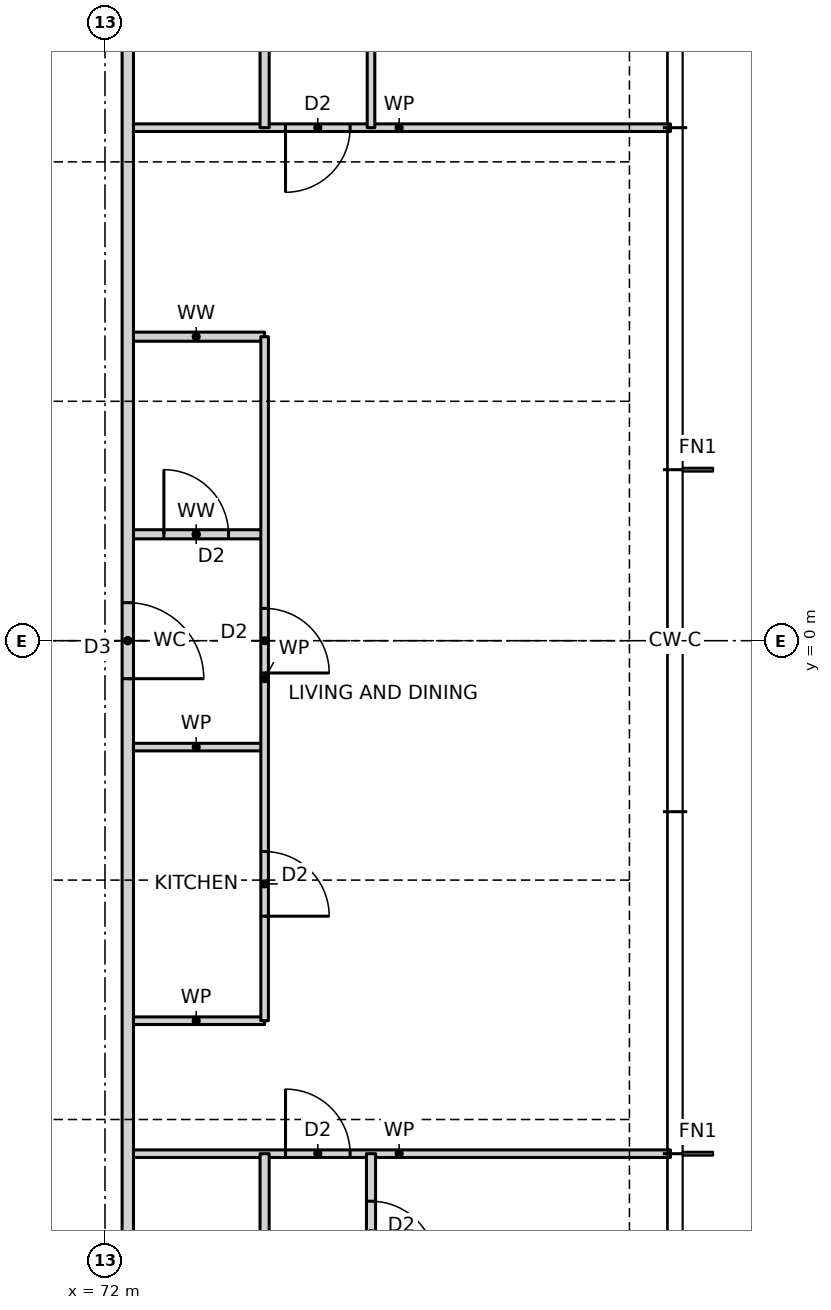
"""IFC4 building model, lengths in metres.
Left out: names, types, materials, properties, quantities, classifications, styles, units other than length and angle.
Written with IfcOpenShell. Run it as: python <this file> out.ifc"""

import sys

from ifc_helpers import new_model, si_unit, direction, frame, frame_2d, origin, place, context, subcontext, project, spatial, rectangle, extrude, element, fill, save


model = new_model("IFC4")
c1 = context("Model", 3, precision=1e-05, world=origin(), true_north=direction((0.0, 1.0)))
c2 = subcontext(c1, "Body", "Model", "MODEL_VIEW")
j1 = project(units=[si_unit("LENGTHUNIT", "METRE"), si_unit("PLANEANGLEUNIT", "RADIAN")], contexts=[c1])
p1 = place(None, origin())
s1 = spatial("IfcSite", under=j1, at=p1, CompositionType="ELEMENT")
p2 = place(p1, origin())
s2 = spatial("IfcBuilding", under=s1, at=p2, CompositionType="ELEMENT")
p3 = place(p2, frame((0.0, 0.0, 71.0)))
s3 = spatial("IfcBuildingStorey", under=s2, at=p3, CompositionType="ELEMENT", Elevation=71.0)
p4 = place(p3, frame((72.3, -6.75, 0.0), z_axis=(0.0, 0.0, 1.0), x_axis=(1.0, 0.0, 0.0)))
e1 = element("IfcWall", 1, at=p4, inside=s3, PredefinedType="PARTITIONING", context=c2, shape_type="SweptSolid", body=[
    extrude(rectangle(XDim=7.14, YDim=0.1, at=frame_2d((3.57, 0.0))), origin(), (0.0, 0.0, 1.0), 3.2),
])
p5 = place(p4, frame((2.075, 0.0, 0.0)))
e2 = element("IfcOpeningElement", 2, at=p5, cuts=e1, PredefinedType="OPENING", context=c2, shape_type="SweptSolid", body=[
    extrude(rectangle(XDim=0.85, YDim=2.1, at=frame_2d((0.425, 1.05))), frame((0.0, 0.06, 0.0), z_axis=(0.0, -1.0, 0.0), x_axis=(1.0, 0.0, 0.0)), (0.0, 0.0, 1.0), 0.12),
])
for number, where, z_axis, x_axis in (
    (3, (72.3, -5.0, 0.0), (0.0, 0.0, 1.0), (1.0, 0.0, 0.0)),
    (4, (72.3, -1.4, 0.0), (0.0, 0.0, 1.0), (1.0, 0.0, 0.0)),
):
    element("IfcWall", number, at=place(p3, frame(where, z_axis=z_axis, x_axis=x_axis)), inside=s3, PredefinedType="PARTITIONING", context=c2, shape_type="SweptSolid", body=[
        extrude(rectangle(XDim=1.8, YDim=0.1, at=frame_2d((0.9, 0.0))), origin(), (0.0, 0.0, 1.0), 3.2),
    ])
p6 = place(p3, frame((72.3, 1.4, 0.0), z_axis=(0.0, 0.0, 1.0), x_axis=(1.0, 0.0, 0.0)))
e5 = element("IfcWall", 5, at=p6, inside=s3, PredefinedType="PARTITIONING", context=c2, shape_type="SweptSolid", body=[
    extrude(rectangle(XDim=1.8, YDim=0.12, at=frame_2d((0.9, 0.0))), origin(), (0.0, 0.0, 1.0), 3.2),
])
p7 = place(p6, frame((0.475, 0.0, 0.0)))
e6 = element("IfcOpeningElement", 6, at=p7, cuts=e5, PredefinedType="OPENING", context=c2, shape_type="SweptSolid", body=[
    extrude(rectangle(XDim=0.85, YDim=2.1, at=frame_2d((0.425, 1.05))), frame((0.0, 0.07, 0.0), z_axis=(0.0, -1.0, 0.0), x_axis=(1.0, 0.0, 0.0)), (0.0, 0.0, 1.0), 0.14),
])
p8 = place(p3, frame((72.3, 4.0, 0.0), z_axis=(0.0, 0.0, 1.0), x_axis=(1.0, 0.0, 0.0)))
e7 = element("IfcWall", 7, at=p8, inside=s3, PredefinedType="PARTITIONING", context=c2, shape_type="SweptSolid", body=[
    extrude(rectangle(XDim=1.8, YDim=0.12, at=frame_2d((0.9, 0.0))), origin(), (0.0, 0.0, 1.0), 3.2),
])
p9 = place(p3, frame((72.3, 6.75, 0.0), z_axis=(0.0, 0.0, 1.0), x_axis=(1.0, 0.0, 0.0)))
e8 = element("IfcWall", 8, at=p9, inside=s3, PredefinedType="PARTITIONING", context=c2, shape_type="SweptSolid", body=[
    extrude(rectangle(XDim=7.14, YDim=0.1, at=frame_2d((3.57, 0.0))), origin(), (0.0, 0.0, 1.0), 3.2),
])
p10 = place(p9, frame((2.075, 0.0, 0.0)))
e9 = element("IfcOpeningElement", 9, at=p10, cuts=e8, PredefinedType="OPENING", context=c2, shape_type="SweptSolid", body=[
    extrude(rectangle(XDim=0.85, YDim=2.1, at=frame_2d((0.425, 1.05))), frame((0.0, 0.06, 0.0), z_axis=(0.0, -1.0, 0.0), x_axis=(1.0, 0.0, 0.0)), (0.0, 0.0, 1.0), 0.12),
])
p11 = place(p3, frame((75.5, -13.45, 0.0), z_axis=(0.0, 0.0, 1.0), x_axis=(0.0, 1.0, 0.0)))
e10 = element("IfcWall", 10, at=p11, inside=s3, PredefinedType="PARTITIONING", context=c2, shape_type="SweptSolid", body=[
    extrude(rectangle(XDim=6.7, YDim=0.12, at=frame_2d((3.35, 0.0))), origin(), (0.0, 0.0, 1.0), 3.2),
])
p12 = place(p11, frame((5.225, 0.0, 0.0)))
e11 = element("IfcOpeningElement", 11, at=p12, cuts=e10, PredefinedType="OPENING", context=c2, shape_type="SweptSolid", body=[
    extrude(rectangle(XDim=0.85, YDim=2.1, at=frame_2d((0.425, 1.05))), frame((0.0, 0.07, 0.0), z_axis=(0.0, -1.0, 0.0), x_axis=(1.0, 0.0, 0.0)), (0.0, 0.0, 1.0), 0.14),
])
p13 = place(p11, frame((0.675, 0.0, 0.0)))
e12 = element("IfcOpeningElement", 12, at=p13, cuts=e10, PredefinedType="OPENING", context=c2, shape_type="SweptSolid", body=[
    extrude(rectangle(XDim=0.85, YDim=2.1, at=frame_2d((0.425, 1.05))), frame((0.0, 0.07, 0.0), z_axis=(0.0, -1.0, 0.0), x_axis=(1.0, 0.0, 0.0)), (0.0, 0.0, 1.0), 0.14),
])
p14 = place(p3, frame((75.5, 6.75, 0.0), z_axis=(0.0, 0.0, 1.0), x_axis=(0.0, 1.0, 0.0)))
e13 = element("IfcWall", 13, at=p14, inside=s3, PredefinedType="PARTITIONING", context=c2, shape_type="SweptSolid", body=[
    extrude(rectangle(XDim=6.7, YDim=0.1, at=frame_2d((3.35, 0.0))), origin(), (0.0, 0.0, 1.0), 3.2),
])
p15 = place(p14, frame((1.825, 0.0, 0.0)))
e14 = element("IfcOpeningElement", 14, at=p15, cuts=e13, PredefinedType="OPENING", context=c2, shape_type="SweptSolid", body=[
    extrude(rectangle(XDim=0.85, YDim=2.1, at=frame_2d((0.425, 1.05))), frame((0.0, 0.06, 0.0), z_axis=(0.0, -1.0, 0.0), x_axis=(1.0, 0.0, 0.0)), (0.0, 0.0, 1.0), 0.12),
])
p16 = place(p14, frame((5.175, 0.0, 0.0)))
e15 = element("IfcOpeningElement", 15, at=p16, cuts=e13, PredefinedType="OPENING", context=c2, shape_type="SweptSolid", body=[
    extrude(rectangle(XDim=0.85, YDim=2.1, at=frame_2d((0.425, 1.05))), frame((0.0, 0.06, 0.0), z_axis=(0.0, -1.0, 0.0), x_axis=(1.0, 0.0, 0.0)), (0.0, 0.0, 1.0), 0.12),
])
p17 = place(p3, frame((74.1, -12.614, 0.0), z_axis=(0.0, 0.0, 1.0), x_axis=(0.0, 1.0, 0.0)))
e16 = element("IfcWall", 16, at=p17, inside=s3, PredefinedType="PARTITIONING", context=c2, shape_type="SweptSolid", body=[
    extrude(rectangle(XDim=5.864, YDim=0.12, at=frame_2d((2.932, 0.0))), origin(), (0.0, 0.0, 1.0), 3.2),
])
p18 = place(p17, frame((2.507, 0.0, 0.0)))
e17 = element("IfcOpeningElement", 17, at=p18, cuts=e16, PredefinedType="OPENING", context=c2, shape_type="SweptSolid", body=[
    extrude(rectangle(XDim=0.85, YDim=2.1, at=frame_2d((0.425, 1.05))), frame((0.0, 0.07, 0.0), z_axis=(0.0, -1.0, 0.0), x_axis=(1.0, 0.0, 0.0)), (0.0, 0.0, 1.0), 0.14),
])
p19 = place(p3, frame((74.1, -5.0, 0.0), z_axis=(0.0, 0.0, 1.0), x_axis=(0.0, 1.0, 0.0)))
e18 = element("IfcWall", 18, at=p19, inside=s3, PredefinedType="PARTITIONING", context=c2, shape_type="SweptSolid", body=[
    extrude(rectangle(XDim=9.0, YDim=0.1, at=frame_2d((4.5, 0.0))), origin(), (0.0, 0.0, 1.0), 3.2),
])
p20 = place(p19, frame((1.375, 0.0, 0.0)))
e19 = element("IfcOpeningElement", 19, at=p20, cuts=e18, PredefinedType="OPENING", context=c2, shape_type="SweptSolid", body=[
    extrude(rectangle(XDim=0.85, YDim=2.1, at=frame_2d((0.425, 1.05))), frame((0.0, 0.06, 0.0), z_axis=(0.0, -1.0, 0.0), x_axis=(1.0, 0.0, 0.0)), (0.0, 0.0, 1.0), 0.12),
])
p21 = place(p19, frame((4.575, 0.0, 0.0)))
e20 = element("IfcOpeningElement", 20, at=p21, cuts=e18, PredefinedType="OPENING", context=c2, shape_type="SweptSolid", body=[
    extrude(rectangle(XDim=0.85, YDim=2.1, at=frame_2d((0.425, 1.05))), frame((0.0, 0.06, 0.0), z_axis=(0.0, -1.0, 0.0), x_axis=(1.0, 0.0, 0.0)), (0.0, 0.0, 1.0), 0.12),
])
p22 = place(p3, frame((74.1, 6.75, 0.0), z_axis=(0.0, 0.0, 1.0), x_axis=(0.0, 1.0, 0.0)))
e21 = element("IfcWall", 21, at=p22, inside=s3, PredefinedType="PARTITIONING", context=c2, shape_type="SweptSolid", body=[
    extrude(rectangle(XDim=5.864, YDim=0.12, at=frame_2d((2.932, 0.0))), origin(), (0.0, 0.0, 1.0), 3.2),
])
p23 = place(p22, frame((2.507, 0.0, 0.0)))
e22 = element("IfcOpeningElement", 22, at=p23, cuts=e21, PredefinedType="OPENING", context=c2, shape_type="SweptSolid", body=[
    extrude(rectangle(XDim=0.85, YDim=2.1, at=frame_2d((0.425, 1.05))), frame((0.0, 0.07, 0.0), z_axis=(0.0, -1.0, 0.0), x_axis=(1.0, 0.0, 0.0)), (0.0, 0.0, 1.0), 0.14),
])
p24 = place(p3, frame((72.3, -10.568, 0.0), z_axis=(0.0, 0.0, 1.0), x_axis=(0.0, 1.0, 0.0)))
e23 = element("IfcWall", 23, at=p24, inside=s3, PredefinedType="PARTITIONING", context=c2, shape_type="SweptSolid", body=[
    extrude(rectangle(XDim=21.136, YDim=0.15, at=frame_2d((10.568, 0.0))), origin(), (0.0, 0.0, 1.0), 3.2),
])
p25 = place(p24, frame((10.068, 0.0, 0.0)))
e24 = element("IfcOpeningElement", 24, at=p25, cuts=e23, PredefinedType="OPENING", context=c2, shape_type="SweptSolid", body=[
    extrude(rectangle(XDim=1.0, YDim=2.1, at=frame_2d((0.5, 1.05))), frame((0.0, 0.085, 0.0), z_axis=(0.0, -1.0, 0.0), x_axis=(1.0, 0.0, 0.0)), (0.0, 0.0, 1.0), 0.17),
])
p26 = place(p20, frame((0.85, 0.0, 0.0), z_axis=(0.0, 0.0, 1.0), x_axis=(-1.0, 0.0, 0.0)))
e25 = element("IfcDoor", 25, at=p26, inside=s3, OperationType="SINGLE_SWING_RIGHT", PredefinedType="DOOR", context=c2, shape_type="SweptSolid", body=[
    extrude(rectangle(XDim=0.85, YDim=2.1, at=frame_2d((0.425, 1.05))), frame((0.0, 0.025, 0.0), z_axis=(0.0, -1.0, 0.0), x_axis=(1.0, 0.0, 0.0)), (0.0, 0.0, 1.0), 0.05),
])
fill(e19, e25)
p27 = place(p25, frame((1.0, 0.0, 0.0), z_axis=(0.0, 0.0, 1.0), x_axis=(-1.0, 0.0, 0.0)))
e26 = element("IfcDoor", 26, at=p27, inside=s3, OperationType="SINGLE_SWING_RIGHT", PredefinedType="DOOR", context=c2, shape_type="SweptSolid", body=[
    extrude(rectangle(XDim=1.0, YDim=2.1, at=frame_2d((0.5, 1.05))), frame((0.0, 0.025, 0.0), z_axis=(0.0, -1.0, 0.0), x_axis=(1.0, 0.0, 0.0)), (0.0, 0.0, 1.0), 0.05),
])
fill(e24, e26)
p28 = place(p21, frame((0.85, 0.0, 0.0), z_axis=(0.0, 0.0, 1.0), x_axis=(-1.0, 0.0, 0.0)))
e27 = element("IfcDoor", 27, at=p28, inside=s3, OperationType="SINGLE_SWING_RIGHT", PredefinedType="DOOR", context=c2, shape_type="SweptSolid", body=[
    extrude(rectangle(XDim=0.85, YDim=2.1, at=frame_2d((0.425, 1.05))), frame((0.0, 0.025, 0.0), z_axis=(0.0, -1.0, 0.0), x_axis=(1.0, 0.0, 0.0)), (0.0, 0.0, 1.0), 0.05),
])
fill(e20, e27)
p29 = place(p7, origin())
e28 = element("IfcDoor", 28, at=p29, inside=s3, OperationType="SINGLE_SWING_LEFT", PredefinedType="DOOR", context=c2, shape_type="SweptSolid", body=[
    extrude(rectangle(XDim=0.85, YDim=2.1, at=frame_2d((0.425, 1.05))), frame((0.0, 0.025, 0.0), z_axis=(0.0, -1.0, 0.0), x_axis=(1.0, 0.0, 0.0)), (0.0, 0.0, 1.0), 0.05),
])
fill(e6, e28)
p30 = place(p5, origin())
e29 = element("IfcDoor", 29, at=p30, inside=s3, OperationType="SINGLE_SWING_LEFT", PredefinedType="DOOR", context=c2, shape_type="SweptSolid", body=[
    extrude(rectangle(XDim=0.85, YDim=2.1, at=frame_2d((0.425, 1.05))), frame((0.0, 0.025, 0.0), z_axis=(0.0, -1.0, 0.0), x_axis=(1.0, 0.0, 0.0)), (0.0, 0.0, 1.0), 0.05),
])
fill(e2, e29)
p31 = place(p12, frame((0.85, 0.0, 0.0), z_axis=(0.0, 0.0, 1.0), x_axis=(-1.0, 0.0, 0.0)))
e30 = element("IfcDoor", 30, at=p31, inside=s3, OperationType="SINGLE_SWING_RIGHT", PredefinedType="DOOR", context=c2, shape_type="SweptSolid", body=[
    extrude(rectangle(XDim=0.85, YDim=2.1, at=frame_2d((0.425, 1.05))), frame((0.0, 0.025, 0.0), z_axis=(0.0, -1.0, 0.0), x_axis=(1.0, 0.0, 0.0)), (0.0, 0.0, 1.0), 0.05),
])
fill(e11, e30)
p32 = place(p10, frame((0.85, 0.0, 0.0), z_axis=(0.0, 0.0, 1.0), x_axis=(-1.0, 0.0, 0.0)))
e31 = element("IfcDoor", 31, at=p32, inside=s3, OperationType="SINGLE_SWING_RIGHT", PredefinedType="DOOR", context=c2, shape_type="SweptSolid", body=[
    extrude(rectangle(XDim=0.85, YDim=2.1, at=frame_2d((0.425, 1.05))), frame((0.0, 0.025, 0.0), z_axis=(0.0, -1.0, 0.0), x_axis=(1.0, 0.0, 0.0)), (0.0, 0.0, 1.0), 0.05),
])
fill(e9, e31)
save(model, sys.argv[1])
